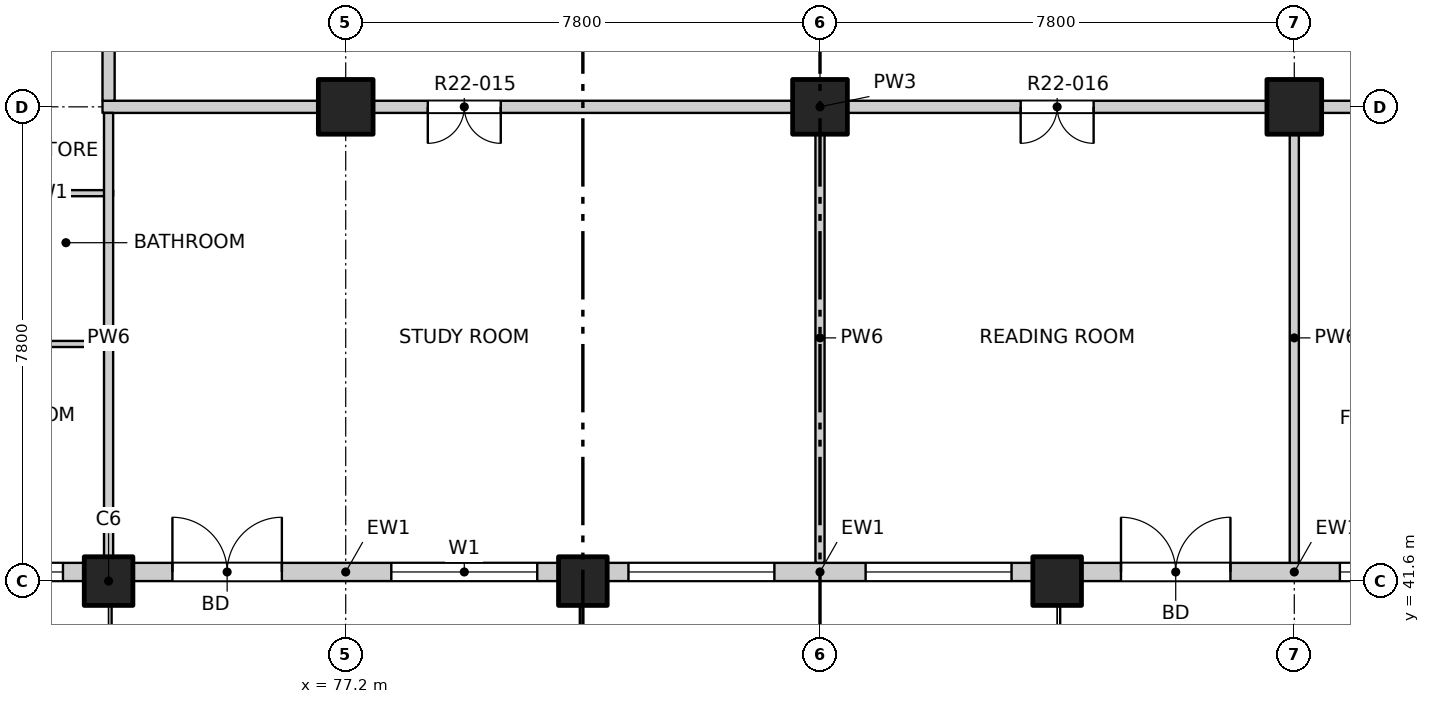
"""IFC4 building model, lengths in metres.
Left out: names, types, materials, properties, quantities, classifications, styles, units other than length and angle.
Written with IfcOpenShell. Run it as: python <this file> out.ifc"""

import sys

from ifc_helpers import new_model, si_unit, direction, frame, frame_2d, origin, origin_2d, place, context, subcontext, project, spatial, rectangle, extrude, element, fill, save


model = new_model("IFC4")
c1 = context("Model", 3, precision=1e-05, world=origin(), true_north=direction((0.0, 1.0)))
c2 = subcontext(c1, "Body", "Model", "MODEL_VIEW")
j1 = project(units=[si_unit("LENGTHUNIT", "METRE"), si_unit("PLANEANGLEUNIT", "RADIAN")], contexts=[c1])
p1 = place(None, origin())
s1 = spatial("IfcSite", under=j1, at=p1, CompositionType="ELEMENT")
p2 = place(p1, origin())
s2 = spatial("IfcBuilding", under=s1, at=p2, CompositionType="ELEMENT")
p3 = place(p2, frame((0.0, 0.0, 231.3)))
s3 = spatial("IfcBuildingStorey", under=s2, at=p3, CompositionType="ELEMENT", Elevation=231.3)
for number, where, z_axis, x_axis in (
    (1, (73.3, 41.6, -0.25), (0.0, 0.0, 1.0), (1.0, 0.0, 0.0)),
    (2, (81.1, 41.6, -0.25), (0.0, 0.0, 1.0), (1.0, 0.0, 0.0)),
    (3, (88.9, 41.6, -0.25), (0.0, 0.0, 1.0), (1.0, 0.0, 0.0)),
):
    element("IfcColumn", number, at=place(p3, frame(where, z_axis=z_axis, x_axis=x_axis)), inside=s3, PredefinedType="COLUMN", context=c2, shape_type="SweptSolid", body=[
        extrude(rectangle(XDim=0.8, YDim=0.8, at=origin_2d()), origin(), (0.0, 0.0, 1.0), 3.4),
    ])
for number, where, z_axis, x_axis in (
    (4, (77.2, 49.4, -0.25), (0.0, 0.0, 1.0), (1.0, 0.0, 0.0)),
    (5, (85.0, 49.4, -0.25), (0.0, 0.0, 1.0), (1.0, 0.0, 0.0)),
    (6, (92.8, 49.4, -0.25), (0.0, 0.0, 1.0), (1.0, 0.0, 0.0)),
):
    element("IfcColumn", number, at=place(p3, frame(where, z_axis=z_axis, x_axis=x_axis)), inside=s3, PredefinedType="COLUMN", context=c2, shape_type="SweptSolid", body=[
        extrude(rectangle(XDim=0.9, YDim=0.9, at=origin_2d()), origin(), (0.0, 0.0, 1.0), 3.4),
    ])
p4 = place(p3, frame((65.5, 41.75, 0.0), z_axis=(0.0, 0.0, 1.0), x_axis=(1.0, 0.0, 0.0)))
e7 = element("IfcWall", 7, at=p4, inside=s3, PredefinedType="SOLIDWALL", context=c2, shape_type="SweptSolid", body=[
    extrude(rectangle(XDim=7.4, YDim=0.3, at=frame_2d((3.7, 0.0))), origin(), (0.0, 0.0, 1.0), 2.7),
])
p5 = place(p4, frame((0.75, 0.0, 0.9)))
e8 = element("IfcOpeningElement", 8, at=p5, cuts=e7, PredefinedType="OPENING", context=c2, shape_type="SweptSolid", body=[
    extrude(rectangle(XDim=2.4, YDim=1.8, at=frame_2d((1.2, 0.9))), frame((0.0, 0.16, 0.0), z_axis=(0.0, -1.0, 0.0), x_axis=(1.0, 0.0, 0.0)), (0.0, 0.0, 1.0), 0.32),
])
p6 = place(p4, frame((4.65, 0.0, 0.9)))
e9 = element("IfcOpeningElement", 9, at=p6, cuts=e7, PredefinedType="OPENING", context=c2, shape_type="SweptSolid", body=[
    extrude(rectangle(XDim=2.4, YDim=1.8, at=frame_2d((1.2, 0.9))), frame((0.0, 0.16, 0.0), z_axis=(0.0, -1.0, 0.0), x_axis=(1.0, 0.0, 0.0)), (0.0, 0.0, 1.0), 0.32),
])
p7 = place(p3, frame((73.7, 41.75, 0.0), z_axis=(0.0, 0.0, 1.0), x_axis=(1.0, 0.0, 0.0)))
e10 = element("IfcWall", 10, at=p7, inside=s3, PredefinedType="SOLIDWALL", context=c2, shape_type="SweptSolid", body=[
    extrude(rectangle(XDim=7.0, YDim=0.3, at=frame_2d((3.5, 0.0))), origin(), (0.0, 0.0, 1.0), 2.7),
])
p8 = place(p7, frame((0.65, 0.0, 0.0)))
e11 = element("IfcOpeningElement", 11, at=p8, cuts=e10, PredefinedType="OPENING", context=c2, shape_type="SweptSolid", body=[
    extrude(rectangle(XDim=1.8, YDim=2.4, at=frame_2d((0.9, 1.2))), frame((0.0, 0.16, 0.0), z_axis=(0.0, -1.0, 0.0), x_axis=(1.0, 0.0, 0.0)), (0.0, 0.0, 1.0), 0.32),
])
p9 = place(p7, frame((4.25, 0.0, 0.9)))
e12 = element("IfcOpeningElement", 12, at=p9, cuts=e10, PredefinedType="OPENING", context=c2, shape_type="SweptSolid", body=[
    extrude(rectangle(XDim=2.4, YDim=1.8, at=frame_2d((1.2, 0.9))), frame((0.0, 0.16, 0.0), z_axis=(0.0, -1.0, 0.0), x_axis=(1.0, 0.0, 0.0)), (0.0, 0.0, 1.0), 0.32),
])
p10 = place(p3, frame((81.5, 41.75, 0.0), z_axis=(0.0, 0.0, 1.0), x_axis=(1.0, 0.0, 0.0)))
e13 = element("IfcWall", 13, at=p10, inside=s3, PredefinedType="SOLIDWALL", context=c2, shape_type="SweptSolid", body=[
    extrude(rectangle(XDim=7.0, YDim=0.3, at=frame_2d((3.5, 0.0))), origin(), (0.0, 0.0, 1.0), 2.7),
])
p11 = place(p10, frame((0.35, 0.0, 0.9)))
e14 = element("IfcOpeningElement", 14, at=p11, cuts=e13, PredefinedType="OPENING", context=c2, shape_type="SweptSolid", body=[
    extrude(rectangle(XDim=2.4, YDim=1.8, at=frame_2d((1.2, 0.9))), frame((0.0, 0.16, 0.0), z_axis=(0.0, -1.0, 0.0), x_axis=(1.0, 0.0, 0.0)), (0.0, 0.0, 1.0), 0.32),
])
p12 = place(p10, frame((4.25, 0.0, 0.9)))
e15 = element("IfcOpeningElement", 15, at=p12, cuts=e13, PredefinedType="OPENING", context=c2, shape_type="SweptSolid", body=[
    extrude(rectangle(XDim=2.4, YDim=1.8, at=frame_2d((1.2, 0.9))), frame((0.0, 0.16, 0.0), z_axis=(0.0, -1.0, 0.0), x_axis=(1.0, 0.0, 0.0)), (0.0, 0.0, 1.0), 0.32),
])
p13 = place(p3, frame((89.3, 41.75, 0.0), z_axis=(0.0, 0.0, 1.0), x_axis=(1.0, 0.0, 0.0)))
e16 = element("IfcWall", 16, at=p13, inside=s3, PredefinedType="SOLIDWALL", context=c2, shape_type="SweptSolid", body=[
    extrude(rectangle(XDim=7.0, YDim=0.3, at=frame_2d((3.5, 0.0))), origin(), (0.0, 0.0, 1.0), 2.7),
])
p14 = place(p13, frame((0.65, 0.0, 0.0)))
e17 = element("IfcOpeningElement", 17, at=p14, cuts=e16, PredefinedType="OPENING", context=c2, shape_type="SweptSolid", body=[
    extrude(rectangle(XDim=1.8, YDim=2.4, at=frame_2d((0.9, 1.2))), frame((0.0, 0.16, 0.0), z_axis=(0.0, -1.0, 0.0), x_axis=(1.0, 0.0, 0.0)), (0.0, 0.0, 1.0), 0.32),
])
p15 = place(p13, frame((4.25, 0.0, 0.9)))
e18 = element("IfcOpeningElement", 18, at=p15, cuts=e16, PredefinedType="OPENING", context=c2, shape_type="SweptSolid", body=[
    extrude(rectangle(XDim=2.4, YDim=1.8, at=frame_2d((1.2, 0.9))), frame((0.0, 0.16, 0.0), z_axis=(0.0, -1.0, 0.0), x_axis=(1.0, 0.0, 0.0)), (0.0, 0.0, 1.0), 0.32),
])
p16 = place(p3, frame((61.9, 45.5, 0.0), z_axis=(0.0, 0.0, 1.0), x_axis=(1.0, 0.0, 0.0)))
e19 = element("IfcWall", 19, at=p16, inside=s3, PredefinedType="PARTITIONING", context=c2, shape_type="SweptSolid", body=[
    extrude(rectangle(XDim=11.475, YDim=0.1, at=frame_2d((5.737, 0.0))), origin(), (0.0, 0.0, 1.0), 3.15),
])
p17 = place(p16, frame((7.965, 0.0, 0.0)))
e20 = element("IfcOpeningElement", 20, at=p17, cuts=e19, PredefinedType="OPENING", context=c2, shape_type="SweptSolid", body=[
    extrude(rectangle(XDim=0.9, YDim=2.1, at=frame_2d((0.45, 1.05))), frame((0.0, 0.06, 0.0), z_axis=(0.0, -1.0, 0.0), x_axis=(1.0, 0.0, 0.0)), (0.0, 0.0, 1.0), 0.12),
])
p18 = place(p3, frame((71.18, 47.98, 0.0), z_axis=(0.0, 0.0, 1.0), x_axis=(1.0, 0.0, 0.0)))
e21 = element("IfcWall", 21, at=p18, inside=s3, PredefinedType="PARTITIONING", context=c2, shape_type="SweptSolid", body=[
    extrude(rectangle(XDim=2.195, YDim=0.1, at=frame_2d((1.097, 0.0))), origin(), (0.0, 0.0, 1.0), 3.15),
])
p19 = place(p3, frame((73.2, 49.4, 0.0), z_axis=(0.0, 0.0, 1.0), x_axis=(1.0, 0.0, 0.0)))
e22 = element("IfcWall", 22, at=p19, inside=s3, PredefinedType="PARTITIONING", context=c2, shape_type="SweptSolid", body=[
    extrude(rectangle(XDim=23.6, YDim=0.2, at=frame_2d((11.8, 0.0))), origin(), (0.0, 0.0, 1.0), 3.15),
])
p20 = place(p19, frame((5.35, 0.0, 0.0)))
e23 = element("IfcOpeningElement", 23, at=p20, cuts=e22, PredefinedType="OPENING", context=c2, shape_type="SweptSolid", body=[
    extrude(rectangle(XDim=1.2, YDim=2.1, at=frame_2d((0.6, 1.05))), frame((0.0, 0.11, 0.0), z_axis=(0.0, -1.0, 0.0), x_axis=(1.0, 0.0, 0.0)), (0.0, 0.0, 1.0), 0.22),
])
p21 = place(p19, frame((15.1, 0.0, 0.0)))
e24 = element("IfcOpeningElement", 24, at=p21, cuts=e22, PredefinedType="OPENING", context=c2, shape_type="SweptSolid", body=[
    extrude(rectangle(XDim=1.2, YDim=2.1, at=frame_2d((0.6, 1.05))), frame((0.0, 0.11, 0.0), z_axis=(0.0, -1.0, 0.0), x_axis=(1.0, 0.0, 0.0)), (0.0, 0.0, 1.0), 0.22),
])
p22 = place(p19, frame((21.1, 0.0, 0.0)))
e25 = element("IfcOpeningElement", 25, at=p22, cuts=e22, PredefinedType="OPENING", context=c2, shape_type="SweptSolid", body=[
    extrude(rectangle(XDim=0.9, YDim=2.1, at=frame_2d((0.45, 1.05))), frame((0.0, 0.11, 0.0), z_axis=(0.0, -1.0, 0.0), x_axis=(1.0, 0.0, 0.0)), (0.0, 0.0, 1.0), 0.22),
])
p23 = place(p3, frame((73.3, 41.9, 0.0), z_axis=(0.0, 0.0, 1.0), x_axis=(0.0, 1.0, 0.0)))
e26 = element("IfcWall", 26, at=p23, inside=s3, PredefinedType="PARTITIONING", context=c2, shape_type="SweptSolid", body=[
    extrude(rectangle(XDim=7.4, YDim=0.15, at=frame_2d((3.7, 0.0))), origin(), (0.0, 0.0, 1.0), 3.15),
])
p24 = place(p3, frame((73.3, 49.5, 0.0), z_axis=(0.0, 0.0, 1.0), x_axis=(0.0, 1.0, 0.0)))
e27 = element("IfcWall", 27, at=p24, inside=s3, PredefinedType="PARTITIONING", context=c2, shape_type="SweptSolid", body=[
    extrude(rectangle(XDim=34.9, YDim=0.2, at=frame_2d((17.45, 0.0))), origin(), (0.0, 0.0, 1.0), 3.15),
])
p25 = place(p24, frame((3.575, 0.0, 0.0)))
e28 = element("IfcOpeningElement", 28, at=p25, cuts=e27, PredefinedType="OPENING", context=c2, shape_type="SweptSolid", body=[
    extrude(rectangle(XDim=1.0, YDim=2.1, at=frame_2d((0.5, 1.05))), frame((0.0, 0.11, 0.0), z_axis=(0.0, -1.0, 0.0), x_axis=(1.0, 0.0, 0.0)), (0.0, 0.0, 1.0), 0.22),
])
p26 = place(p24, frame((18.075, 0.0, 0.0)))
e29 = element("IfcOpeningElement", 29, at=p26, cuts=e27, PredefinedType="OPENING", context=c2, shape_type="SweptSolid", body=[
    extrude(rectangle(XDim=1.0, YDim=2.1, at=frame_2d((0.5, 1.05))), frame((0.0, 0.11, 0.0), z_axis=(0.0, -1.0, 0.0), x_axis=(1.0, 0.0, 0.0)), (0.0, 0.0, 1.0), 0.22),
])
p27 = place(p24, frame((26.175, 0.0, 0.0)))
e30 = element("IfcOpeningElement", 30, at=p27, cuts=e27, PredefinedType="OPENING", context=c2, shape_type="SweptSolid", body=[
    extrude(rectangle(XDim=1.0, YDim=2.1, at=frame_2d((0.5, 1.05))), frame((0.0, 0.11, 0.0), z_axis=(0.0, -1.0, 0.0), x_axis=(1.0, 0.0, 0.0)), (0.0, 0.0, 1.0), 0.22),
])
for number, where, z_axis, x_axis in (
    (31, (85.0, 41.9, 0.0), (0.0, 0.0, 1.0), (0.0, 1.0, 0.0)),
    (32, (92.8, 41.9, 0.0), (0.0, 0.0, 1.0), (0.0, 1.0, 0.0)),
):
    element("IfcWall", number, at=place(p3, frame(where, z_axis=z_axis, x_axis=x_axis)), inside=s3, PredefinedType="PARTITIONING", context=c2, shape_type="SweptSolid", body=[
        extrude(rectangle(XDim=7.4, YDim=0.15, at=frame_2d((3.7, 0.0))), origin(), (0.0, 0.0, 1.0), 3.15),
    ])
p28 = place(p6, origin())
e33 = element("IfcWindow", 33, at=p28, inside=s3, PartitioningType="DOUBLE_PANEL_VERTICAL", PredefinedType="WINDOW", context=c2, shape_type="SweptSolid", body=[
    extrude(rectangle(XDim=2.4, YDim=1.8, at=frame_2d((1.2, 0.9))), frame((0.0, 0.03, 0.0), z_axis=(0.0, -1.0, 0.0), x_axis=(1.0, 0.0, 0.0)), (0.0, 0.0, 1.0), 0.06),
])
fill(e9, e33)
p29 = place(p8, origin())
e34 = element("IfcDoor", 34, at=p29, inside=s3, OperationType="DOUBLE_DOOR_SINGLE_SWING", PredefinedType="DOOR", context=c2, shape_type="SweptSolid", body=[
    extrude(rectangle(XDim=1.8, YDim=2.4, at=frame_2d((0.9, 1.2))), frame((0.0, 0.025, 0.0), z_axis=(0.0, -1.0, 0.0), x_axis=(1.0, 0.0, 0.0)), (0.0, 0.0, 1.0), 0.05),
])
fill(e11, e34)
p30 = place(p9, origin())
e35 = element("IfcWindow", 35, at=p30, inside=s3, PartitioningType="DOUBLE_PANEL_VERTICAL", PredefinedType="WINDOW", context=c2, shape_type="SweptSolid", body=[
    extrude(rectangle(XDim=2.4, YDim=1.8, at=frame_2d((1.2, 0.9))), frame((0.0, 0.03, 0.0), z_axis=(0.0, -1.0, 0.0), x_axis=(1.0, 0.0, 0.0)), (0.0, 0.0, 1.0), 0.06),
])
fill(e12, e35)
p31 = place(p11, origin())
e36 = element("IfcWindow", 36, at=p31, inside=s3, PartitioningType="DOUBLE_PANEL_VERTICAL", PredefinedType="WINDOW", context=c2, shape_type="SweptSolid", body=[
    extrude(rectangle(XDim=2.4, YDim=1.8, at=frame_2d((1.2, 0.9))), frame((0.0, 0.03, 0.0), z_axis=(0.0, -1.0, 0.0), x_axis=(1.0, 0.0, 0.0)), (0.0, 0.0, 1.0), 0.06),
])
fill(e14, e36)
p32 = place(p12, origin())
e37 = element("IfcWindow", 37, at=p32, inside=s3, PartitioningType="DOUBLE_PANEL_VERTICAL", PredefinedType="WINDOW", context=c2, shape_type="SweptSolid", body=[
    extrude(rectangle(XDim=2.4, YDim=1.8, at=frame_2d((1.2, 0.9))), frame((0.0, 0.03, 0.0), z_axis=(0.0, -1.0, 0.0), x_axis=(1.0, 0.0, 0.0)), (0.0, 0.0, 1.0), 0.06),
])
fill(e15, e37)
p33 = place(p14, origin())
e38 = element("IfcDoor", 38, at=p33, inside=s3, OperationType="DOUBLE_DOOR_SINGLE_SWING", PredefinedType="DOOR", context=c2, shape_type="SweptSolid", body=[
    extrude(rectangle(XDim=1.8, YDim=2.4, at=frame_2d((0.9, 1.2))), frame((0.0, 0.025, 0.0), z_axis=(0.0, -1.0, 0.0), x_axis=(1.0, 0.0, 0.0)), (0.0, 0.0, 1.0), 0.05),
])
fill(e17, e38)
p34 = place(p15, origin())
e39 = element("IfcWindow", 39, at=p34, inside=s3, PartitioningType="DOUBLE_PANEL_VERTICAL", PredefinedType="WINDOW", context=c2, shape_type="SweptSolid", body=[
    extrude(rectangle(XDim=2.4, YDim=1.8, at=frame_2d((1.2, 0.9))), frame((0.0, 0.03, 0.0), z_axis=(0.0, -1.0, 0.0), x_axis=(1.0, 0.0, 0.0)), (0.0, 0.0, 1.0), 0.06),
])
fill(e18, e39)
p35 = place(p20, origin())
e40 = element("IfcDoor", 40, at=p35, inside=s3, OperationType="DOUBLE_DOOR_SINGLE_SWING", PredefinedType="DOOR", context=c2, shape_type="SweptSolid", body=[
    extrude(rectangle(XDim=1.2, YDim=2.1, at=frame_2d((0.6, 1.05))), frame((0.0, 0.025, 0.0), z_axis=(0.0, -1.0, 0.0), x_axis=(1.0, 0.0, 0.0)), (0.0, 0.0, 1.0), 0.05),
])
fill(e23, e40)
p36 = place(p21, origin())
e41 = element("IfcDoor", 41, at=p36, inside=s3, OperationType="DOUBLE_DOOR_SINGLE_SWING", PredefinedType="DOOR", context=c2, shape_type="SweptSolid", body=[
    extrude(rectangle(XDim=1.2, YDim=2.1, at=frame_2d((0.6, 1.05))), frame((0.0, 0.025, 0.0), z_axis=(0.0, -1.0, 0.0), x_axis=(1.0, 0.0, 0.0)), (0.0, 0.0, 1.0), 0.05),
])
fill(e24, e41)
save(model, sys.argv[1])
